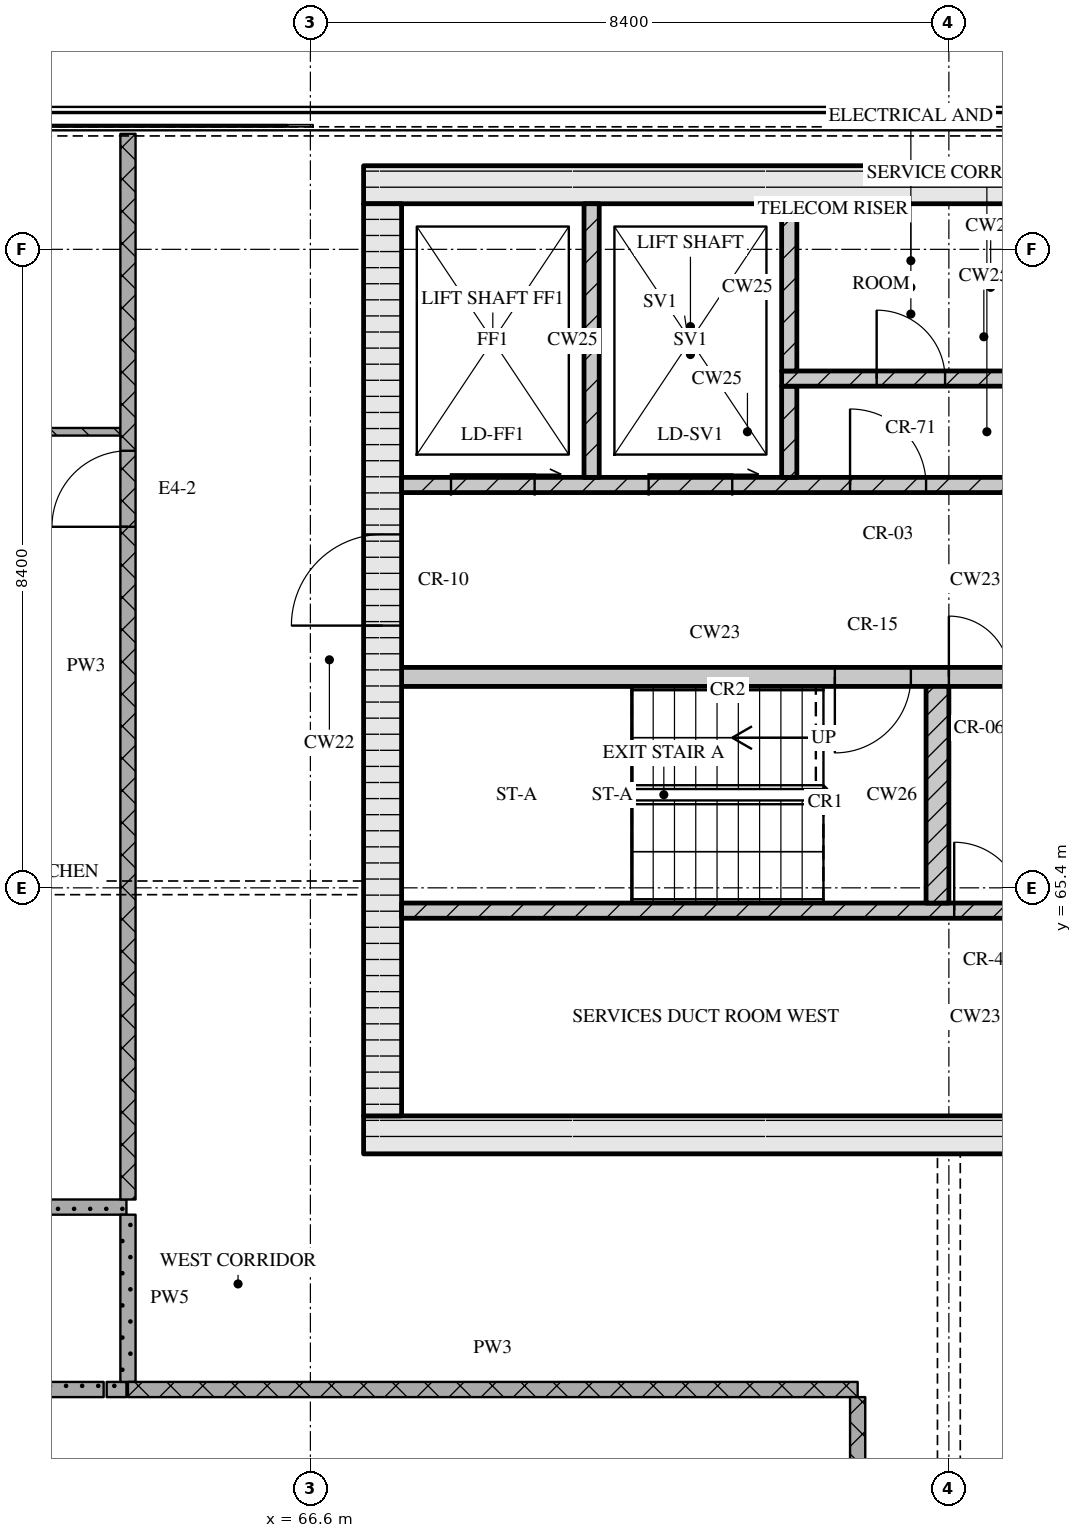
"""IFC4 building model, lengths in metres.
Left out: names, types, materials, properties, quantities, classifications, styles, units other than length and angle.
Written with IfcOpenShell. Run it as: python <this file> out.ifc"""

import sys

from ifc_helpers import new_model, si_unit, direction, frame, frame_2d, origin, place, context, subcontext, project, spatial, rectangle, extrude, element, fill, save


model = new_model("IFC4")
c1 = context("Model", 3, precision=1e-05, world=origin(), true_north=direction((0.0, 1.0)))
c2 = subcontext(c1, "Body", "Model", "MODEL_VIEW")
j1 = project(units=[si_unit("LENGTHUNIT", "METRE"), si_unit("PLANEANGLEUNIT", "RADIAN")], contexts=[c1])
p1 = place(None, origin())
s1 = spatial("IfcSite", under=j1, at=p1, CompositionType="ELEMENT")
p2 = place(p1, origin())
s2 = spatial("IfcBuilding", under=s1, at=p2, CompositionType="ELEMENT")
p3 = place(p2, frame((0.0, 0.0, 285.15)))
s3 = spatial("IfcBuildingStorey", under=s2, at=p3, CompositionType="ELEMENT", Elevation=285.15)
p4 = place(p3, frame((67.3, 62.15, 0.0), z_axis=(0.0, 0.0, 1.0), x_axis=(1.0, 0.0, 0.0)))
e1 = element("IfcWall", 1, at=p4, inside=s3, PredefinedType="SOLIDWALL", context=c2, shape_type="SweptSolid", body=[
    extrude(rectangle(XDim=40.6, YDim=0.5, at=frame_2d((20.3, 0.0))), origin(), (0.0, 0.0, 1.0), 3.32),
])
p5 = place(p4, frame((20.65, 0.0, 0.0)))
e2 = element("IfcOpeningElement", 2, at=p5, cuts=e1, PredefinedType="OPENING", context=c2, shape_type="SweptSolid", body=[
    extrude(rectangle(XDim=1.8, YDim=2.1, at=frame_2d((0.9, 1.05))), frame((0.0, 0.26, 0.0), z_axis=(0.0, -1.0, 0.0), x_axis=(1.0, 0.0, 0.0)), (0.0, 0.0, 1.0), 0.52),
])
p6 = place(p3, frame((67.3, 74.65, 0.0), z_axis=(0.0, 0.0, 1.0), x_axis=(1.0, 0.0, 0.0)))
e3 = element("IfcWall", 3, at=p6, inside=s3, PredefinedType="SOLIDWALL", context=c2, shape_type="SweptSolid", body=[
    extrude(rectangle(XDim=40.6, YDim=0.5, at=frame_2d((20.3, 0.0))), origin(), (0.0, 0.0, 1.0), 3.32),
])
p7 = place(p3, frame((67.55, 62.4, 0.0), z_axis=(0.0, 0.0, 1.0), x_axis=(0.0, 1.0, 0.0)))
e4 = element("IfcWall", 4, at=p7, inside=s3, PredefinedType="SOLIDWALL", context=c2, shape_type="SweptSolid", body=[
    extrude(rectangle(XDim=12.0, YDim=0.5, at=frame_2d((6.0, 0.0))), origin(), (0.0, 0.0, 1.0), 3.32),
])
p8 = place(p7, frame((6.45, 0.0, 0.0)))
e5 = element("IfcOpeningElement", 5, at=p8, cuts=e4, PredefinedType="OPENING", context=c2, shape_type="SweptSolid", body=[
    extrude(rectangle(XDim=1.2, YDim=2.1, at=frame_2d((0.6, 1.05))), frame((0.0, 0.26, 0.0), z_axis=(0.0, -1.0, 0.0), x_axis=(1.0, 0.0, 0.0)), (0.0, 0.0, 1.0), 0.52),
])
p9 = place(p3, frame((67.8, 65.1, 0.0), z_axis=(0.0, 0.0, 1.0), x_axis=(1.0, 0.0, 0.0)))
e6 = element("IfcWall", 6, at=p9, inside=s3, PredefinedType="SOLIDWALL", context=c2, shape_type="SweptSolid", body=[
    extrude(rectangle(XDim=18.5, YDim=0.2, at=frame_2d((9.25, 0.0))), origin(), (0.0, 0.0, 1.0), 3.32),
])
p10 = place(p9, frame((7.27, 0.0, 0.0)))
e7 = element("IfcOpeningElement", 7, at=p10, cuts=e6, PredefinedType="OPENING", context=c2, shape_type="SweptSolid", body=[
    extrude(rectangle(XDim=0.9, YDim=2.1, at=frame_2d((0.45, 1.05))), frame((0.0, 0.11, 0.0), z_axis=(0.0, -1.0, 0.0), x_axis=(1.0, 0.0, 0.0)), (0.0, 0.0, 1.0), 0.22),
])
p11 = place(p9, frame((9.65, 0.0, 0.0)))
e8 = element("IfcOpeningElement", 8, at=p11, cuts=e6, PredefinedType="OPENING", context=c2, shape_type="SweptSolid", body=[
    extrude(rectangle(XDim=0.9, YDim=2.1, at=frame_2d((0.45, 1.05))), frame((0.0, 0.11, 0.0), z_axis=(0.0, -1.0, 0.0), x_axis=(1.0, 0.0, 0.0)), (0.0, 0.0, 1.0), 0.22),
])
p12 = place(p9, frame((13.36, 0.0, 0.0)))
e9 = element("IfcOpeningElement", 9, at=p12, cuts=e6, PredefinedType="OPENING", context=c2, shape_type="SweptSolid", body=[
    extrude(rectangle(XDim=0.9, YDim=2.1, at=frame_2d((0.45, 1.05))), frame((0.0, 0.11, 0.0), z_axis=(0.0, -1.0, 0.0), x_axis=(1.0, 0.0, 0.0)), (0.0, 0.0, 1.0), 0.22),
])
p13 = place(p9, frame((16.7, 0.0, 0.0)))
e10 = element("IfcOpeningElement", 10, at=p13, cuts=e6, PredefinedType="OPENING", context=c2, shape_type="SweptSolid", body=[
    extrude(rectangle(XDim=0.9, YDim=2.1, at=frame_2d((0.45, 1.05))), frame((0.0, 0.11, 0.0), z_axis=(0.0, -1.0, 0.0), x_axis=(1.0, 0.0, 0.0)), (0.0, 0.0, 1.0), 0.22),
])
p14 = place(p3, frame((74.85, 65.2, 0.0), z_axis=(0.0, 0.0, 1.0), x_axis=(0.0, 1.0, 0.0)))
e11 = element("IfcWall", 11, at=p14, inside=s3, PredefinedType="SOLIDWALL", context=c2, shape_type="SweptSolid", body=[
    extrude(rectangle(XDim=2.85, YDim=0.3, at=frame_2d((1.425, 0.0))), origin(), (0.0, 0.0, 1.0), 3.32),
])
p15 = place(p3, frame((67.8, 68.175, 0.0), z_axis=(0.0, 0.0, 1.0), x_axis=(1.0, 0.0, 0.0)))
e12 = element("IfcWall", 12, at=p15, inside=s3, PredefinedType="SOLIDWALL", context=c2, shape_type="SweptSolid", body=[
    extrude(rectangle(XDim=8.25, YDim=0.25, at=frame_2d((4.125, 0.0))), origin(), (0.0, 0.0, 1.0), 3.32),
])
p16 = place(p15, frame((5.7, 0.0, 0.0)))
e13 = element("IfcOpeningElement", 13, at=p16, cuts=e12, PredefinedType="OPENING", context=c2, shape_type="SweptSolid", body=[
    extrude(rectangle(XDim=1.0, YDim=2.1, at=frame_2d((0.5, 1.05))), frame((0.0, 0.135, 0.0), z_axis=(0.0, -1.0, 0.0), x_axis=(1.0, 0.0, 0.0)), (0.0, 0.0, 1.0), 0.27),
])
p17 = place(p15, frame((7.2, 0.0, 0.0)))
e14 = element("IfcOpeningElement", 14, at=p17, cuts=e12, PredefinedType="OPENING", context=c2, shape_type="SweptSolid", body=[
    extrude(rectangle(XDim=0.8, YDim=2.1, at=frame_2d((0.4, 1.05))), frame((0.0, 0.135, 0.0), z_axis=(0.0, -1.0, 0.0), x_axis=(1.0, 0.0, 0.0)), (0.0, 0.0, 1.0), 0.27),
])
p18 = place(p3, frame((67.8, 70.7, 0.0), z_axis=(0.0, 0.0, 1.0), x_axis=(1.0, 0.0, 0.0)))
e15 = element("IfcWall", 15, at=p18, inside=s3, PredefinedType="SOLIDWALL", context=c2, shape_type="SweptSolid", body=[
    extrude(rectangle(XDim=39.6, YDim=0.2, at=frame_2d((19.8, 0.0))), origin(), (0.0, 0.0, 1.0), 3.32),
])
p19 = place(p18, frame((0.65, 0.0, 0.0)))
e16 = element("IfcOpeningElement", 16, at=p19, cuts=e15, PredefinedType="OPENING", context=c2, shape_type="SweptSolid", body=[
    extrude(rectangle(XDim=1.1, YDim=2.1, at=frame_2d((0.55, 1.05))), frame((0.0, 0.11, 0.0), z_axis=(0.0, -1.0, 0.0), x_axis=(1.0, 0.0, 0.0)), (0.0, 0.0, 1.0), 0.22),
])
p20 = place(p18, frame((3.25, 0.0, 0.0)))
e17 = element("IfcOpeningElement", 17, at=p20, cuts=e15, PredefinedType="OPENING", context=c2, shape_type="SweptSolid", body=[
    extrude(rectangle(XDim=1.1, YDim=2.1, at=frame_2d((0.55, 1.05))), frame((0.0, 0.11, 0.0), z_axis=(0.0, -1.0, 0.0), x_axis=(1.0, 0.0, 0.0)), (0.0, 0.0, 1.0), 0.22),
])
p21 = place(p18, frame((5.9, 0.0, 0.0)))
e18 = element("IfcOpeningElement", 18, at=p21, cuts=e15, PredefinedType="OPENING", context=c2, shape_type="SweptSolid", body=[
    extrude(rectangle(XDim=1.0, YDim=2.1, at=frame_2d((0.5, 1.05))), frame((0.0, 0.11, 0.0), z_axis=(0.0, -1.0, 0.0), x_axis=(1.0, 0.0, 0.0)), (0.0, 0.0, 1.0), 0.22),
])
p22 = place(p18, frame((21.7, 0.0, 0.0)))
e19 = element("IfcOpeningElement", 19, at=p22, cuts=e15, PredefinedType="OPENING", context=c2, shape_type="SweptSolid", body=[
    extrude(rectangle(XDim=1.0, YDim=2.1, at=frame_2d((0.5, 1.05))), frame((0.0, 0.11, 0.0), z_axis=(0.0, -1.0, 0.0), x_axis=(1.0, 0.0, 0.0)), (0.0, 0.0, 1.0), 0.22),
])
p23 = place(p18, frame((32.7, 0.0, 0.0)))
e20 = element("IfcOpeningElement", 20, at=p23, cuts=e15, PredefinedType="OPENING", context=c2, shape_type="SweptSolid", body=[
    extrude(rectangle(XDim=1.0, YDim=2.1, at=frame_2d((0.5, 1.05))), frame((0.0, 0.11, 0.0), z_axis=(0.0, -1.0, 0.0), x_axis=(1.0, 0.0, 0.0)), (0.0, 0.0, 1.0), 0.22),
])
p24 = place(p18, frame((35.25, 0.0, 0.0)))
e21 = element("IfcOpeningElement", 21, at=p24, cuts=e15, PredefinedType="OPENING", context=c2, shape_type="SweptSolid", body=[
    extrude(rectangle(XDim=1.1, YDim=2.1, at=frame_2d((0.55, 1.05))), frame((0.0, 0.11, 0.0), z_axis=(0.0, -1.0, 0.0), x_axis=(1.0, 0.0, 0.0)), (0.0, 0.0, 1.0), 0.22),
])
p25 = place(p18, frame((37.85, 0.0, 0.0)))
e22 = element("IfcOpeningElement", 22, at=p25, cuts=e15, PredefinedType="OPENING", context=c2, shape_type="SweptSolid", body=[
    extrude(rectangle(XDim=1.1, YDim=2.1, at=frame_2d((0.55, 1.05))), frame((0.0, 0.11, 0.0), z_axis=(0.0, -1.0, 0.0), x_axis=(1.0, 0.0, 0.0)), (0.0, 0.0, 1.0), 0.22),
])
p26 = place(p3, frame((70.3, 70.8, 0.0), z_axis=(0.0, 0.0, 1.0), x_axis=(0.0, 1.0, 0.0)))
e23 = element("IfcWall", 23, at=p26, inside=s3, PredefinedType="SOLIDWALL", context=c2, shape_type="SweptSolid", body=[
    extrude(rectangle(XDim=3.6, YDim=0.2, at=frame_2d((1.8, 0.0))), origin(), (0.0, 0.0, 1.0), 3.32),
])
p27 = place(p3, frame((72.9, 70.8, 0.0), z_axis=(0.0, 0.0, 1.0), x_axis=(0.0, 1.0, 0.0)))
e24 = element("IfcWall", 24, at=p27, inside=s3, PredefinedType="SOLIDWALL", context=c2, shape_type="SweptSolid", body=[
    extrude(rectangle(XDim=1.2, YDim=0.2, at=frame_2d((0.6, 0.0))), origin(), (0.0, 0.0, 1.0), 3.32),
])
p28 = place(p3, frame((72.8, 72.1, 0.0), z_axis=(0.0, 0.0, 1.0), x_axis=(1.0, 0.0, 0.0)))
e25 = element("IfcWall", 25, at=p28, inside=s3, PredefinedType="SOLIDWALL", context=c2, shape_type="SweptSolid", body=[
    extrude(rectangle(XDim=5.32, YDim=0.2, at=frame_2d((2.66, 0.0))), origin(), (0.0, 0.0, 1.0), 3.32),
])
p29 = place(p28, frame((1.25, 0.0, 0.0)))
e26 = element("IfcOpeningElement", 26, at=p29, cuts=e25, PredefinedType="OPENING", context=c2, shape_type="SweptSolid", body=[
    extrude(rectangle(XDim=0.9, YDim=2.1, at=frame_2d((0.45, 1.05))), frame((0.0, 0.11, 0.0), z_axis=(0.0, -1.0, 0.0), x_axis=(1.0, 0.0, 0.0)), (0.0, 0.0, 1.0), 0.22),
])
p30 = place(p28, frame((3.85, 0.0, 0.0)))
e27 = element("IfcOpeningElement", 27, at=p30, cuts=e25, PredefinedType="OPENING", context=c2, shape_type="SweptSolid", body=[
    extrude(rectangle(XDim=0.9, YDim=2.1, at=frame_2d((0.45, 1.05))), frame((0.0, 0.11, 0.0), z_axis=(0.0, -1.0, 0.0), x_axis=(1.0, 0.0, 0.0)), (0.0, 0.0, 1.0), 0.22),
])
p31 = place(p3, frame((72.9, 72.2, 0.0), z_axis=(0.0, 0.0, 1.0), x_axis=(0.0, 1.0, 0.0)))
e28 = element("IfcWall", 28, at=p31, inside=s3, PredefinedType="SOLIDWALL", context=c2, shape_type="SweptSolid", body=[
    extrude(rectangle(XDim=2.2, YDim=0.2, at=frame_2d((1.1, 0.0))), origin(), (0.0, 0.0, 1.0), 3.32),
])
p32 = place(p3, frame((64.2, 58.8, 0.0), z_axis=(0.0, 0.0, 1.0), x_axis=(1.0, 0.0, 0.0)))
e29 = element("IfcWall", 29, at=p32, inside=s3, PredefinedType="PARTITIONING", context=c2, shape_type="SweptSolid", body=[
    extrude(rectangle(XDim=9.6, YDim=0.2, at=frame_2d((4.8, 0.0))), origin(), (0.0, 0.0, 1.0), 3.32),
])
p33 = place(p3, frame((56.7, 58.8, 0.0), z_axis=(0.0, 0.0, 1.0), x_axis=(1.0, 0.0, 0.0)))
e30 = element("IfcWall", 30, at=p33, inside=s3, PredefinedType="PARTITIONING", context=c2, shape_type="SweptSolid", body=[
    extrude(rectangle(XDim=7.18, YDim=0.2, at=frame_2d((3.59, 0.0))), origin(), (0.0, 0.0, 1.0), 3.32),
])
p34 = place(p3, frame((63.92, 58.8, 0.0), z_axis=(0.0, 0.0, 1.0), x_axis=(1.0, 0.0, 0.0)))
e31 = element("IfcWall", 31, at=p34, inside=s3, PredefinedType="PARTITIONING", context=c2, shape_type="SweptSolid", body=[
    extrude(rectangle(XDim=0.26, YDim=0.2, at=frame_2d((0.13, 0.0))), origin(), (0.0, 0.0, 1.0), 3.32),
])
p35 = place(p3, frame((61.52, 61.2, 0.0), z_axis=(0.0, 0.0, 1.0), x_axis=(1.0, 0.0, 0.0)))
e32 = element("IfcWall", 32, at=p35, inside=s3, PredefinedType="PARTITIONING", context=c2, shape_type="SweptSolid", body=[
    extrude(rectangle(XDim=2.66, YDim=0.2, at=frame_2d((1.33, 0.0))), origin(), (0.0, 0.0, 1.0), 3.32),
])
p36 = place(p3, frame((61.5, 71.4, 0.0), z_axis=(0.0, 0.0, 1.0), x_axis=(1.0, 0.0, 0.0)))
e33 = element("IfcWall", 33, at=p36, inside=s3, PredefinedType="PARTITIONING", context=c2, shape_type="SweptSolid", body=[
    extrude(rectangle(XDim=2.6, YDim=0.1, at=frame_2d((1.3, 0.0))), origin(), (0.0, 0.0, 1.0), 3.32),
])
p37 = place(p3, frame((64.2, 61.3, 0.0), z_axis=(0.0, 0.0, 1.0), x_axis=(0.0, 1.0, 0.0)))
e34 = element("IfcWall", 34, at=p37, inside=s3, PredefinedType="PARTITIONING", context=c2, shape_type="SweptSolid", body=[
    extrude(rectangle(XDim=14.02, YDim=0.2, at=frame_2d((7.01, 0.0))), origin(), (0.0, 0.0, 1.0), 3.32),
])
p38 = place(p37, frame((8.85, 0.0, 0.0)))
e35 = element("IfcOpeningElement", 35, at=p38, cuts=e34, PredefinedType="OPENING", context=c2, shape_type="SweptSolid", body=[
    extrude(rectangle(XDim=1.0, YDim=2.1, at=frame_2d((0.5, 1.05))), frame((0.0, 0.11, 0.0), z_axis=(0.0, -1.0, 0.0), x_axis=(1.0, 0.0, 0.0)), (0.0, 0.0, 1.0), 0.22),
])
p39 = place(p3, frame((64.2, 61.1, 0.0), z_axis=(0.0, 0.0, 1.0), x_axis=(0.0, -1.0, 0.0)))
e36 = element("IfcWall", 36, at=p39, inside=s3, PredefinedType="PARTITIONING", context=c2, shape_type="SweptSolid", body=[
    extrude(rectangle(XDim=2.2, YDim=0.2, at=frame_2d((1.1, 0.0))), origin(), (0.0, 0.0, 1.0), 3.32),
])
p40 = place(p3, frame((73.8, 50.7, 0.0), z_axis=(0.0, 0.0, 1.0), x_axis=(0.0, 1.0, 0.0)))
e37 = element("IfcWall", 37, at=p40, inside=s3, PredefinedType="PARTITIONING", context=c2, shape_type="SweptSolid", body=[
    extrude(rectangle(XDim=8.0, YDim=0.2, at=frame_2d((4.0, 0.0))), origin(), (0.0, 0.0, 1.0), 3.32),
])
p41 = place(p40, frame((4.15, 0.0, 0.0)))
e38 = element("IfcOpeningElement", 38, at=p41, cuts=e37, PredefinedType="OPENING", context=c2, shape_type="SweptSolid", body=[
    extrude(rectangle(XDim=1.0, YDim=2.1, at=frame_2d((0.5, 1.05))), frame((0.0, 0.11, 0.0), z_axis=(0.0, -1.0, 0.0), x_axis=(1.0, 0.0, 0.0)), (0.0, 0.0, 1.0), 0.22),
])
p42 = place(p10, origin())
e39 = element("IfcDoor", 39, at=p42, inside=s3, OperationType="SINGLE_SWING_LEFT", PredefinedType="DOOR", context=c2, shape_type="SweptSolid", body=[
    extrude(rectangle(XDim=0.9, YDim=2.1, at=frame_2d((0.45, 1.05))), frame((0.0, 0.025, 0.0), z_axis=(0.0, -1.0, 0.0), x_axis=(1.0, 0.0, 0.0)), (0.0, 0.0, 1.0), 0.05),
])
fill(e7, e39)
p43 = place(p16, origin())
e40 = element("IfcDoor", 40, at=p43, inside=s3, OperationType="SINGLE_SWING_RIGHT", PredefinedType="DOOR", context=c2, shape_type="SweptSolid", body=[
    extrude(rectangle(XDim=1.0, YDim=2.1, at=frame_2d((0.5, 1.05))), frame((0.0, 0.025, 0.0), z_axis=(0.0, -1.0, 0.0), x_axis=(1.0, 0.0, 0.0)), (0.0, 0.0, 1.0), 0.05),
])
fill(e13, e40)
p44 = place(p17, origin())
e41 = element("IfcDoor", 41, at=p44, inside=s3, OperationType="SINGLE_SWING_LEFT", PredefinedType="DOOR", context=c2, shape_type="SweptSolid", body=[
    extrude(rectangle(XDim=0.8, YDim=2.1, at=frame_2d((0.4, 1.05))), frame((0.0, 0.025, 0.0), z_axis=(0.0, -1.0, 0.0), x_axis=(1.0, 0.0, 0.0)), (0.0, 0.0, 1.0), 0.05),
])
fill(e14, e41)
p45 = place(p8, origin())
e42 = element("IfcDoor", 42, at=p45, inside=s3, OperationType="SINGLE_SWING_LEFT", PredefinedType="DOOR", context=c2, shape_type="SweptSolid", body=[
    extrude(rectangle(XDim=1.2, YDim=2.1, at=frame_2d((0.6, 1.05))), frame((0.0, 0.025, 0.0), z_axis=(0.0, -1.0, 0.0), x_axis=(1.0, 0.0, 0.0)), (0.0, 0.0, 1.0), 0.05),
])
fill(e5, e42)
p46 = place(p19, origin())
e43 = element("IfcDoor", 43, at=p46, inside=s3, OperationType="SLIDING_TO_RIGHT", PredefinedType="DOOR", context=c2, shape_type="SweptSolid", body=[
    extrude(rectangle(XDim=1.1, YDim=2.1, at=frame_2d((0.55, 1.05))), frame((0.0, 0.025, 0.0), z_axis=(0.0, -1.0, 0.0), x_axis=(1.0, 0.0, 0.0)), (0.0, 0.0, 1.0), 0.05),
])
fill(e16, e43)
p47 = place(p20, origin())
e44 = element("IfcDoor", 44, at=p47, inside=s3, OperationType="SLIDING_TO_RIGHT", PredefinedType="DOOR", context=c2, shape_type="SweptSolid", body=[
    extrude(rectangle(XDim=1.1, YDim=2.1, at=frame_2d((0.55, 1.05))), frame((0.0, 0.025, 0.0), z_axis=(0.0, -1.0, 0.0), x_axis=(1.0, 0.0, 0.0)), (0.0, 0.0, 1.0), 0.05),
])
fill(e17, e44)
p48 = place(p21, origin())
e45 = element("IfcDoor", 45, at=p48, inside=s3, OperationType="SINGLE_SWING_LEFT", PredefinedType="DOOR", context=c2, shape_type="SweptSolid", body=[
    extrude(rectangle(XDim=1.0, YDim=2.1, at=frame_2d((0.5, 1.05))), frame((0.0, 0.025, 0.0), z_axis=(0.0, -1.0, 0.0), x_axis=(1.0, 0.0, 0.0)), (0.0, 0.0, 1.0), 0.05),
])
fill(e18, e45)
p49 = place(p29, origin())
e46 = element("IfcDoor", 46, at=p49, inside=s3, OperationType="SINGLE_SWING_LEFT", PredefinedType="DOOR", context=c2, shape_type="SweptSolid", body=[
    extrude(rectangle(XDim=0.9, YDim=2.1, at=frame_2d((0.45, 1.05))), frame((0.0, 0.025, 0.0), z_axis=(0.0, -1.0, 0.0), x_axis=(1.0, 0.0, 0.0)), (0.0, 0.0, 1.0), 0.05),
])
fill(e26, e46)
p50 = place(p38, origin())
e47 = element("IfcDoor", 47, at=p50, inside=s3, OperationType="SINGLE_SWING_LEFT", PredefinedType="DOOR", context=c2, shape_type="SweptSolid", body=[
    extrude(rectangle(XDim=1.0, YDim=2.1, at=frame_2d((0.5, 1.05))), frame((0.0, 0.025, 0.0), z_axis=(0.0, -1.0, 0.0), x_axis=(1.0, 0.0, 0.0)), (0.0, 0.0, 1.0), 0.05),
])
fill(e35, e47)
save(model, sys.argv[1])
